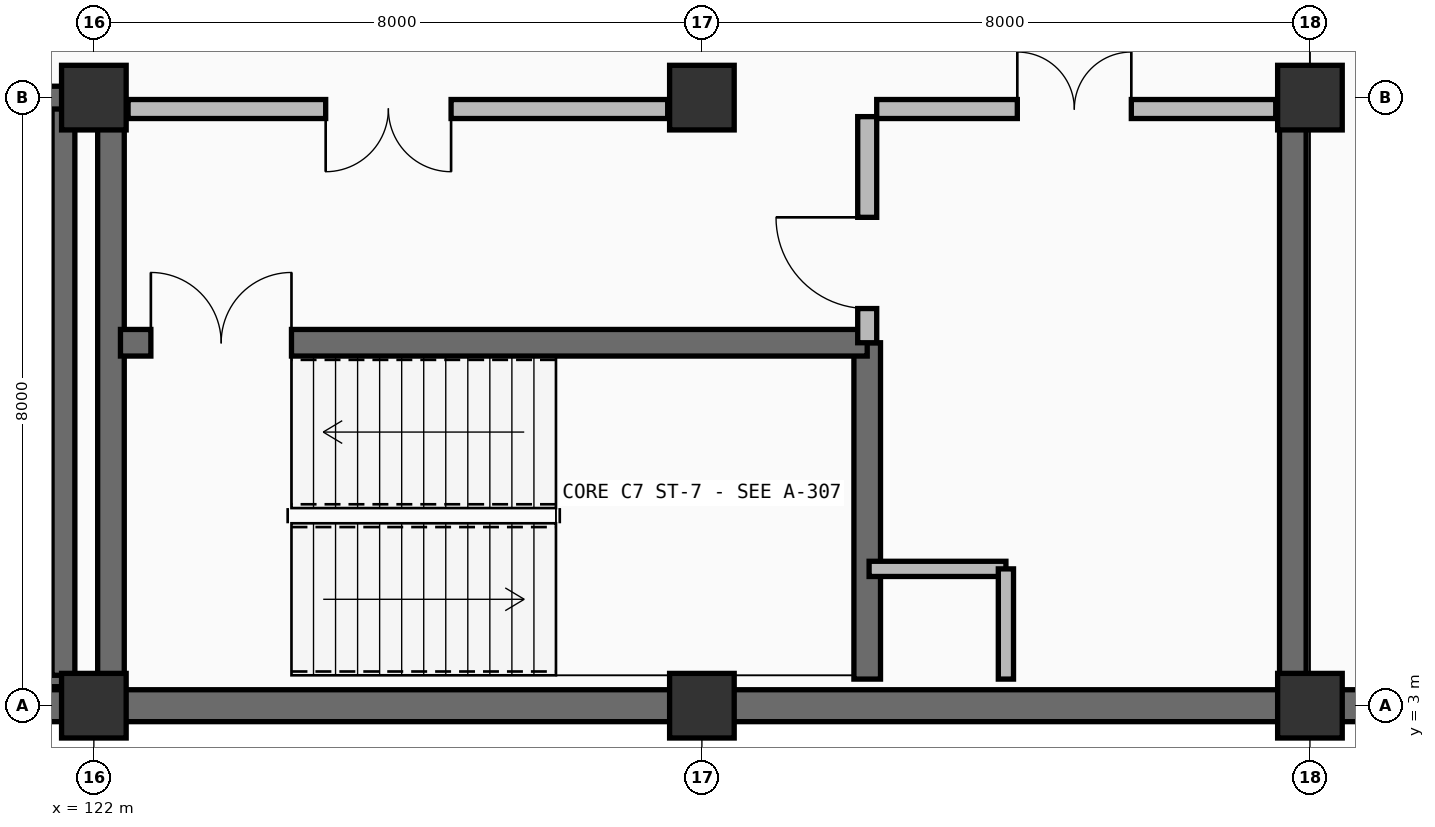
"""IFC4 building model, lengths in metres.
Left out: names, types, materials, properties, quantities, classifications, styles, units other than length and angle.
Written with IfcOpenShell. Run it as: python <this file> out.ifc"""

import sys

from ifc_helpers import new_model, si_unit, direction, frame, frame_2d, origin, origin_2d, place, context, subcontext, project, spatial, rectangle, extrude, element, fill, save


model = new_model("IFC4")
c1 = context("Model", 3, precision=1e-05, world=origin(), true_north=direction((0.0, 1.0)))
c2 = subcontext(c1, "Body", "Model", "MODEL_VIEW")
j1 = project(units=[si_unit("LENGTHUNIT", "METRE"), si_unit("PLANEANGLEUNIT", "RADIAN")], contexts=[c1])
p1 = place(None, origin())
s1 = spatial("IfcSite", under=j1, at=p1, CompositionType="ELEMENT")
p2 = place(p1, origin())
s2 = spatial("IfcBuilding", under=s1, at=p2, CompositionType="ELEMENT")
p3 = place(p2, frame((0.0, 0.0, -4.5)))
s3 = spatial("IfcBuildingStorey", under=s2, at=p3, CompositionType="ELEMENT", Elevation=-4.5)
for number, where, z_axis, x_axis in (
    (1, (122.0, 3.0, -0.6), (0.0, 0.0, 1.0), (1.0, 0.0, 0.0)),
    (2, (122.0, 11.0, -0.6), (0.0, 0.0, 1.0), (1.0, 0.0, 0.0)),
    (3, (130.0, 3.0, -0.6), (0.0, 0.0, 1.0), (1.0, 0.0, 0.0)),
    (4, (130.0, 11.0, -0.6), (0.0, 0.0, 1.0), (1.0, 0.0, 0.0)),
    (5, (138.0, 3.0, -0.6), (0.0, 0.0, 1.0), (1.0, 0.0, 0.0)),
    (6, (138.0, 11.0, -0.6), (0.0, 0.0, 1.0), (1.0, 0.0, 0.0)),
):
    element("IfcColumn", number, at=place(p3, frame(where, z_axis=z_axis, x_axis=x_axis)), inside=s3, PredefinedType="COLUMN", context=c2, shape_type="SweptSolid", body=[
        extrude(rectangle(XDim=0.85, YDim=0.85, at=origin_2d()), origin(), (0.0, 0.0, 1.0), 5.1),
    ])
for number, where, z_axis, x_axis in (
    (7, (146.0, 3.0, 0.0), (0.0, 0.0, 1.0), (-1.0, 0.0, 0.0)),
    (8, (138.0, 3.0, 0.0), (0.0, 0.0, 1.0), (-1.0, 0.0, 0.0)),
    (9, (130.0, 3.0, 0.0), (0.0, 0.0, 1.0), (-1.0, 0.0, 0.0)),
    (10, (122.0, 3.0, 0.0), (0.0, 0.0, 1.0), (-1.0, 0.0, 0.0)),
):
    element("IfcWall", number, at=place(p3, frame(where, z_axis=z_axis, x_axis=x_axis)), inside=s3, PredefinedType="USERDEFINED", context=c2, shape_type="SweptSolid", body=[
        extrude(rectangle(XDim=8.0, YDim=0.42, at=frame_2d((4.0, 0.0))), origin(), (0.0, 0.0, 1.0), 4.5),
    ])
p4 = place(p3, frame((122.225, 3.2, 0.0), z_axis=(0.0, 0.0, 1.0), x_axis=(0.0, 1.0, 0.0)))
e11 = element("IfcWall", 11, at=p4, inside=s3, PredefinedType="SHEAR", context=c2, shape_type="SweptSolid", body=[
    extrude(rectangle(XDim=7.6, YDim=0.35, at=frame_2d((3.8, 0.0))), origin(), (0.0, 0.0, 1.0), 4.2),
])
p5 = place(p3, frame((132.175, 3.35, 0.0), z_axis=(0.0, 0.0, 1.0), x_axis=(0.0, 1.0, 0.0)))
e12 = element("IfcWall", 12, at=p5, inside=s3, PredefinedType="SHEAR", context=c2, shape_type="SweptSolid", body=[
    extrude(rectangle(XDim=4.425, YDim=0.35, at=frame_2d((2.212, 0.0))), origin(), (0.0, 0.0, 1.0), 4.2),
])
p6 = place(p3, frame((137.775, 3.2, 0.0), z_axis=(0.0, 0.0, 1.0), x_axis=(0.0, 1.0, 0.0)))
e13 = element("IfcWall", 13, at=p6, inside=s3, PredefinedType="SHEAR", context=c2, shape_type="SweptSolid", body=[
    extrude(rectangle(XDim=7.6, YDim=0.35, at=frame_2d((3.8, 0.0))), origin(), (0.0, 0.0, 1.0), 4.2),
])
p7 = place(p3, frame((132.2, 4.8, 0.0), z_axis=(0.0, 0.0, 1.0), x_axis=(1.0, 0.0, 0.0)))
e14 = element("IfcWall", 14, at=p7, inside=s3, PredefinedType="PARTITIONING", context=c2, shape_type="SweptSolid", body=[
    extrude(rectangle(XDim=1.8, YDim=0.2, at=frame_2d((0.9, 0.0))), origin(), (0.0, 0.0, 1.0), 4.2),
])
p8 = place(p3, frame((134.0, 3.35, 0.0), z_axis=(0.0, 0.0, 1.0), x_axis=(0.0, 1.0, 0.0)))
e15 = element("IfcWall", 15, at=p8, inside=s3, PredefinedType="PARTITIONING", context=c2, shape_type="SweptSolid", body=[
    extrude(rectangle(XDim=1.45, YDim=0.2, at=frame_2d((0.725, 0.0))), origin(), (0.0, 0.0, 1.0), 4.2),
])
p9 = place(p3, frame((122.35, 7.775, 0.0), z_axis=(0.0, 0.0, 1.0), x_axis=(1.0, 0.0, 0.0)))
e16 = element("IfcWall", 16, at=p9, inside=s3, PredefinedType="SHEAR", context=c2, shape_type="SweptSolid", body=[
    extrude(rectangle(XDim=9.825, YDim=0.35, at=frame_2d((4.913, 0.0))), origin(), (0.0, 0.0, 1.0), 4.2),
])
p10 = place(p9, frame((0.4, 0.0, 0.0)))
e17 = element("IfcOpeningElement", 17, at=p10, cuts=e16, PredefinedType="OPENING", context=c2, shape_type="SweptSolid", body=[
    extrude(rectangle(XDim=1.85, YDim=2.25, at=frame_2d((0.925, 1.125))), frame((0.0, 0.185, 0.0), z_axis=(0.0, -1.0, 0.0), x_axis=(1.0, 0.0, 0.0)), (0.0, 0.0, 1.0), 0.37),
])
p11 = place(p3, frame((132.175, 7.775, 0.0), z_axis=(0.0, 0.0, 1.0), x_axis=(0.0, 1.0, 0.0)))
e18 = element("IfcWall", 18, at=p11, inside=s3, PredefinedType="PARTITIONING", context=c2, shape_type="SweptSolid", body=[
    extrude(rectangle(XDim=2.975, YDim=0.25, at=frame_2d((1.488, 0.0))), origin(), (0.0, 0.0, 1.0), 4.2),
])
p12 = place(p11, frame((0.45, 0.0, 0.0)))
e19 = element("IfcOpeningElement", 19, at=p12, cuts=e18, PredefinedType="OPENING", context=c2, shape_type="SweptSolid", body=[
    extrude(rectangle(XDim=1.2, YDim=2.2, at=frame_2d((0.6, 1.1))), frame((0.0, 0.135, 0.0), z_axis=(0.0, -1.0, 0.0), x_axis=(1.0, 0.0, 0.0)), (0.0, 0.0, 1.0), 0.27),
])
p13 = place(p3, frame((122.45, 10.85, 0.0), z_axis=(0.0, 0.0, 1.0), x_axis=(1.0, 0.0, 0.0)))
e20 = element("IfcWall", 20, at=p13, inside=s3, PredefinedType="PARTITIONING", context=c2, shape_type="SweptSolid", body=[
    extrude(rectangle(XDim=7.1, YDim=0.25, at=frame_2d((3.55, 0.0))), origin(), (0.0, 0.0, 1.0), 3.435),
])
p14 = place(p13, frame((2.6, 0.0, 0.0)))
e21 = element("IfcOpeningElement", 21, at=p14, cuts=e20, PredefinedType="OPENING", context=c2, shape_type="SweptSolid", body=[
    extrude(rectangle(XDim=1.65, YDim=2.25, at=frame_2d((0.825, 1.125))), frame((0.0, 0.135, 0.0), z_axis=(0.0, -1.0, 0.0), x_axis=(1.0, 0.0, 0.0)), (0.0, 0.0, 1.0), 0.27),
])
p15 = place(p3, frame((132.3, 10.85, 0.0), z_axis=(0.0, 0.0, 1.0), x_axis=(1.0, 0.0, 0.0)))
e22 = element("IfcWall", 22, at=p15, inside=s3, PredefinedType="PARTITIONING", context=c2, shape_type="SweptSolid", body=[
    extrude(rectangle(XDim=5.25, YDim=0.25, at=frame_2d((2.625, 0.0))), origin(), (0.0, 0.0, 1.0), 3.435),
])
p16 = place(p15, frame((1.85, 0.0, 0.0)))
e23 = element("IfcOpeningElement", 23, at=p16, cuts=e22, PredefinedType="OPENING", context=c2, shape_type="SweptSolid", body=[
    extrude(rectangle(XDim=1.5, YDim=2.2, at=frame_2d((0.75, 1.1))), frame((0.0, 0.135, 0.0), z_axis=(0.0, -1.0, 0.0), x_axis=(1.0, 0.0, 0.0)), (0.0, 0.0, 1.0), 0.27),
])
p17 = place(p3, frame((100.4, 3.4, 0.0), z_axis=(0.0, 0.0, 1.0), x_axis=(1.0, 0.0, 0.0)))
e24 = element("IfcWall", 24, at=p17, inside=s3, PredefinedType="SHEAR", context=c2, shape_type="SweptSolid", body=[
    extrude(rectangle(XDim=21.2, YDim=0.3, at=frame_2d((10.6, 0.0))), origin(), (0.0, 0.0, 1.0), 4.2),
])
p18 = place(p3, frame((121.6, 3.4, 0.0), z_axis=(0.0, 0.0, 1.0), x_axis=(0.0, 1.0, 0.0)))
e25 = element("IfcWall", 25, at=p18, inside=s3, PredefinedType="SHEAR", context=c2, shape_type="SweptSolid", body=[
    extrude(rectangle(XDim=7.6, YDim=0.3, at=frame_2d((3.8, 0.0))), origin(), (0.0, 0.0, 1.0), 4.2),
])
p19 = place(p3, frame((100.4, 11.0, 0.0), z_axis=(0.0, 0.0, 1.0), x_axis=(1.0, 0.0, 0.0)))
e26 = element("IfcWall", 26, at=p19, inside=s3, PredefinedType="SHEAR", context=c2, shape_type="SweptSolid", body=[
    extrude(rectangle(XDim=21.2, YDim=0.3, at=frame_2d((10.6, 0.0))), origin(), (0.0, 0.0, 1.0), 4.2),
])
p20 = place(p19, frame((8.672, 0.0, 0.0)))
e27 = element("IfcOpeningElement", 27, at=p20, cuts=e26, PredefinedType="OPENING", context=c2, shape_type="SweptSolid", body=[
    extrude(rectangle(XDim=1.85, YDim=2.25, at=frame_2d((0.925, 1.125))), frame((0.0, 0.16, 0.0), z_axis=(0.0, -1.0, 0.0), x_axis=(1.0, 0.0, 0.0)), (0.0, 0.0, 1.0), 0.32),
])
p21 = place(p10, origin())
e28 = element("IfcDoor", 28, at=p21, inside=s3, OperationType="DOUBLE_DOOR_SINGLE_SWING", PredefinedType="DOOR", context=c2, shape_type="SweptSolid", body=[
    extrude(rectangle(XDim=1.85, YDim=2.25, at=frame_2d((0.925, 1.125))), frame((0.0, 0.025, 0.0), z_axis=(0.0, -1.0, 0.0), x_axis=(1.0, 0.0, 0.0)), (0.0, 0.0, 1.0), 0.05),
])
fill(e17, e28)
p22 = place(p12, origin())
e29 = element("IfcDoor", 29, at=p22, inside=s3, OperationType="SINGLE_SWING_RIGHT", PredefinedType="DOOR", context=c2, shape_type="SweptSolid", body=[
    extrude(rectangle(XDim=1.2, YDim=2.2, at=frame_2d((0.6, 1.1))), frame((0.0, 0.025, 0.0), z_axis=(0.0, -1.0, 0.0), x_axis=(1.0, 0.0, 0.0)), (0.0, 0.0, 1.0), 0.05),
])
fill(e19, e29)
p23 = place(p14, frame((1.65, 0.0, 0.0), z_axis=(0.0, 0.0, 1.0), x_axis=(-1.0, 0.0, 0.0)))
e30 = element("IfcDoor", 30, at=p23, inside=s3, OperationType="DOUBLE_DOOR_SINGLE_SWING", PredefinedType="DOOR", context=c2, shape_type="SweptSolid", body=[
    extrude(rectangle(XDim=1.65, YDim=2.25, at=frame_2d((0.825, 1.125))), frame((0.0, 0.025, 0.0), z_axis=(0.0, -1.0, 0.0), x_axis=(1.0, 0.0, 0.0)), (0.0, 0.0, 1.0), 0.05),
])
fill(e21, e30)
p24 = place(p16, origin())
e31 = element("IfcDoor", 31, at=p24, inside=s3, OperationType="DOUBLE_DOOR_SINGLE_SWING", PredefinedType="DOOR", context=c2, shape_type="SweptSolid", body=[
    extrude(rectangle(XDim=1.5, YDim=2.2, at=frame_2d((0.75, 1.1))), frame((0.0, 0.025, 0.0), z_axis=(0.0, -1.0, 0.0), x_axis=(1.0, 0.0, 0.0)), (0.0, 0.0, 1.0), 0.05),
])
fill(e23, e31)
save(model, sys.argv[1])
